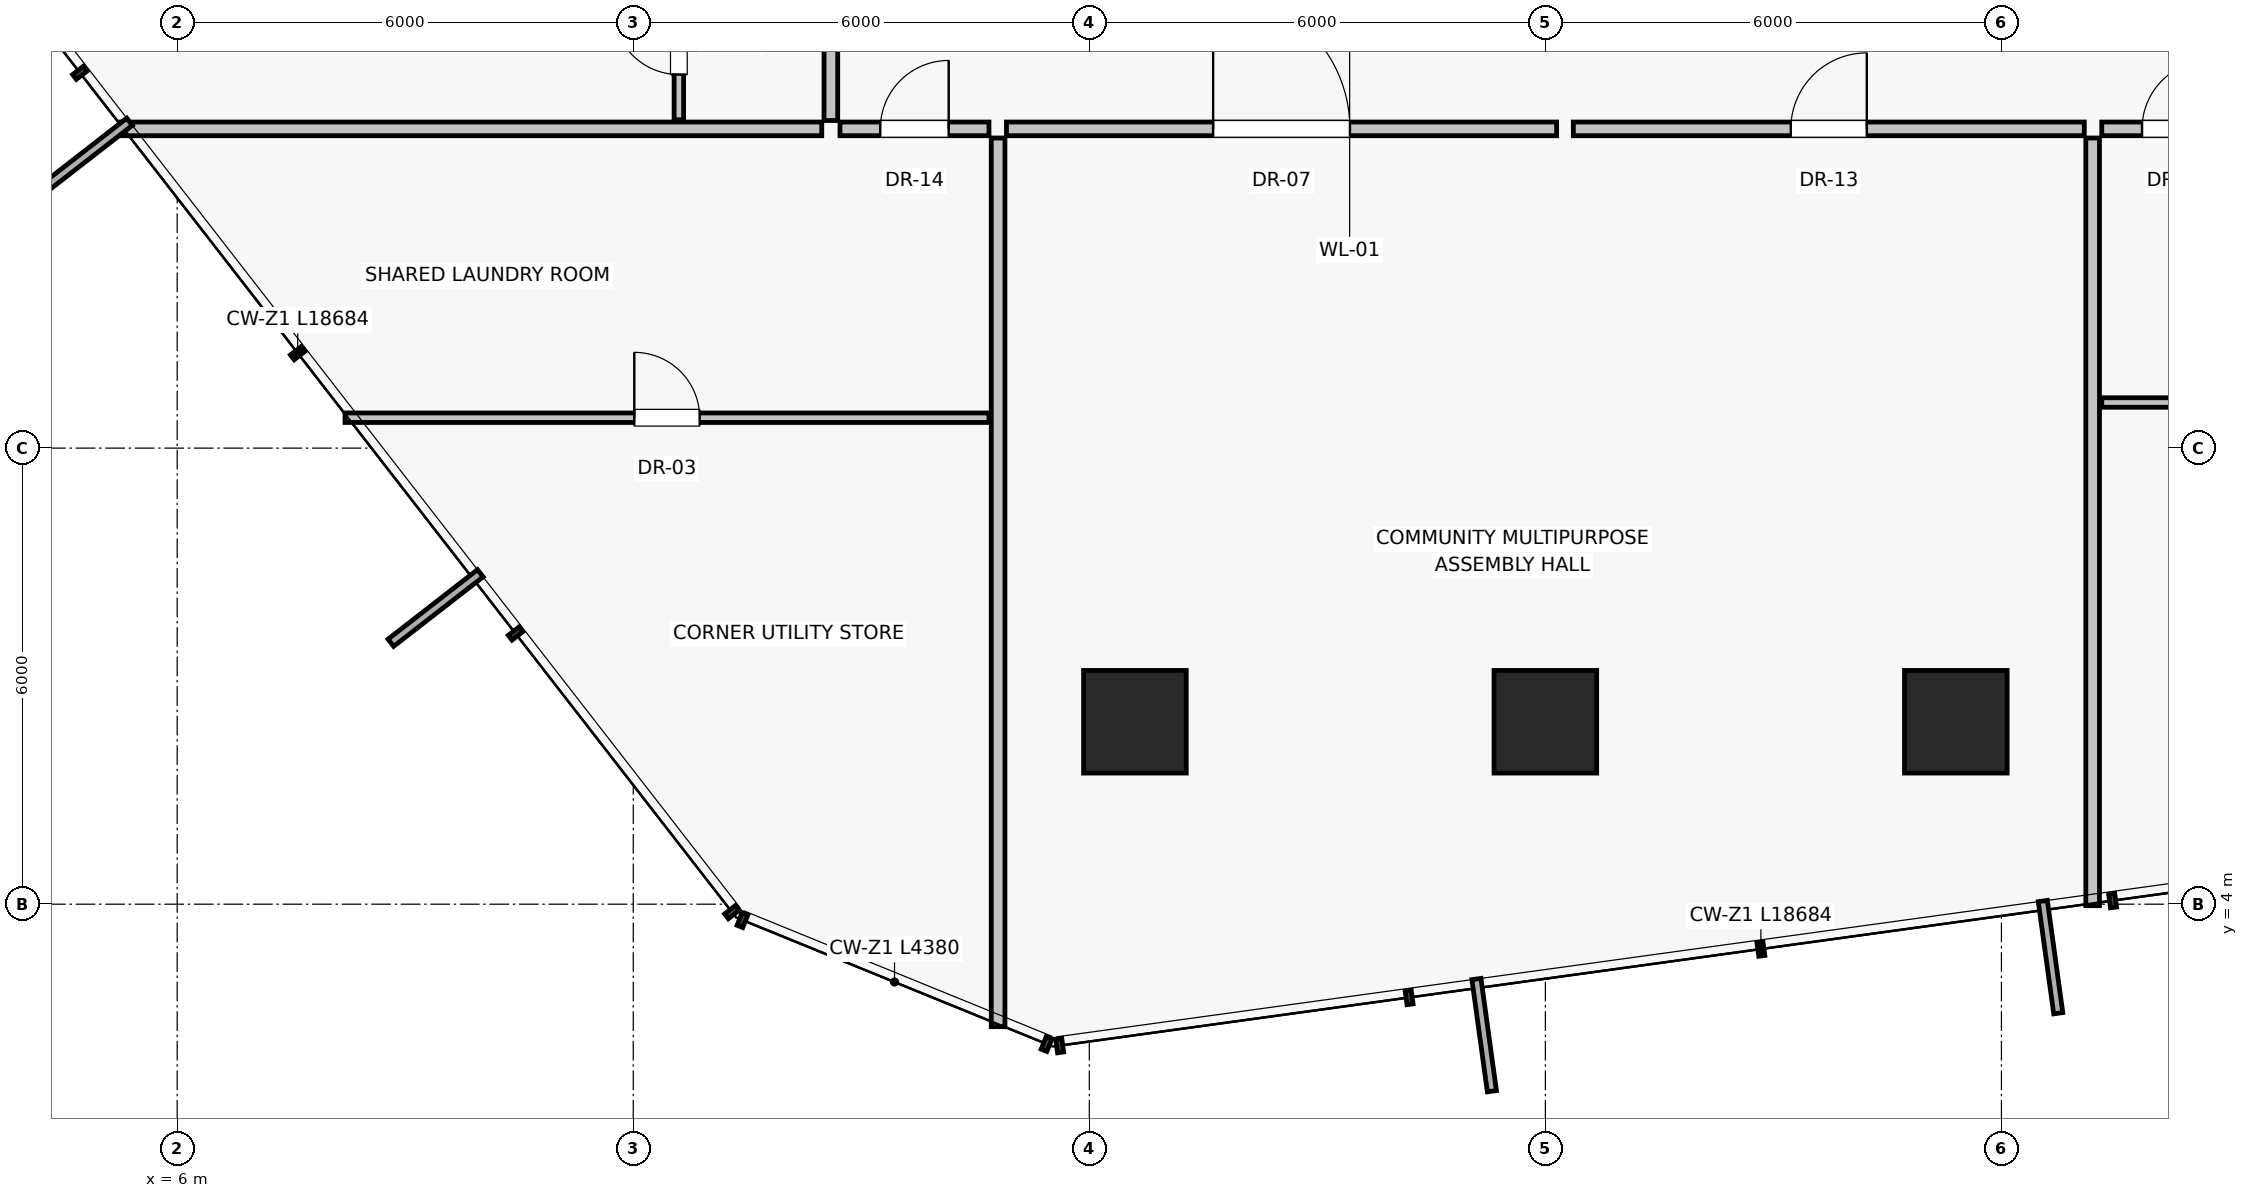
"""IFC4 building model, lengths in metres.
Left out: names, types, materials, properties, quantities, classifications, styles, units other than length and angle.
Written with IfcOpenShell. Run it as: python <this file> out.ifc"""

import sys

from ifc_helpers import new_model, si_unit, direction, frame, frame_2d, origin, origin_2d, place, context, subcontext, project, spatial, rectangle, extrude, source, transform, mapped, element, fill, save


model = new_model("IFC4")
c1 = context("Model", 3, precision=1e-05, world=origin(), true_north=direction((0.0, 1.0)))
c2 = subcontext(c1, "Body", "Model", "MODEL_VIEW")
j1 = project(units=[si_unit("LENGTHUNIT", "METRE"), si_unit("PLANEANGLEUNIT", "RADIAN")], contexts=[c1])
p1 = place(None, origin())
s1 = spatial("IfcSite", under=j1, at=p1, CompositionType="ELEMENT")
p2 = place(p1, origin())
s2 = spatial("IfcBuilding", under=s1, at=p2, CompositionType="ELEMENT")
p3 = place(p2, frame((0.0, 0.0, 50.05)))
s3 = spatial("IfcBuildingStorey", under=s2, at=p3, CompositionType="ELEMENT", Elevation=50.05)
for number, where, z_axis, x_axis in (
    (1, (18.6, 6.4, 0.0), (0.0, 0.0, 1.0), (1.0, 0.0, 0.0)),
    (2, (24.0, 6.4, 0.0), (0.0, 0.0, 1.0), (1.0, 0.0, 0.0)),
    (3, (29.4, 6.4, 0.0), (0.0, 0.0, 1.0), (1.0, 0.0, 0.0)),
):
    element("IfcColumn", number, at=place(p3, frame(where, z_axis=z_axis, x_axis=x_axis)), inside=s3, PredefinedType="COLUMN", context=c2, shape_type="SweptSolid", body=[
        extrude(rectangle(XDim=1.35, YDim=1.35, at=origin_2d()), origin(), (0.0, 0.0, 1.0), 3.25),
    ])
p4 = place(p3, frame((16.8, 14.08, 0.0), z_axis=(0.0, 0.0, 1.0), x_axis=(0.0, -1.0, 0.0)))
e4 = element("IfcWall", 4, at=p4, inside=s3, PredefinedType="PARTITIONING", context=c2, shape_type="SweptSolid", body=[
    extrude(rectangle(XDim=11.692, YDim=0.18, at=frame_2d((5.846, 0.0))), origin(), (0.0, 0.0, 1.0), 3.0),
])
p5 = place(p3, frame((31.2, 14.08, 0.0), z_axis=(0.0, 0.0, 1.0), x_axis=(0.0, -1.0, 0.0)))
e5 = element("IfcWall", 5, at=p5, inside=s3, PredefinedType="PARTITIONING", context=c2, shape_type="SweptSolid", body=[
    extrude(rectangle(XDim=10.1, YDim=0.18, at=frame_2d((5.05, 0.0))), origin(), (0.0, 0.0, 1.0), 3.0),
])
p6 = place(p3, frame((16.91, 14.2, 0.0), z_axis=(0.0, 0.0, 1.0), x_axis=(1.0, 0.0, 0.0)))
e6 = element("IfcWall", 6, at=p6, inside=s3, PredefinedType="PARTITIONING", context=c2, shape_type="SweptSolid", body=[
    extrude(rectangle(XDim=7.238, YDim=0.18, at=frame_2d((3.619, 0.0))), origin(), (0.0, 0.0, 1.0), 3.0),
])
p7 = place(p6, frame((2.719, 0.0, 0.0)))
e7 = element("IfcOpeningElement", 7, at=p7, cuts=e6, PredefinedType="OPENING", context=c2, shape_type="SweptSolid", body=[
    extrude(rectangle(XDim=1.8, YDim=2.25, at=frame_2d((0.9, 1.125))), frame((0.0, 0.1, 0.0), z_axis=(0.0, -1.0, 0.0), x_axis=(1.0, 0.0, 0.0)), (0.0, 0.0, 1.0), 0.2),
])
p8 = place(p3, frame((24.368, 14.2, 0.0), z_axis=(0.0, 0.0, 1.0), x_axis=(1.0, 0.0, 0.0)))
e8 = element("IfcWall", 8, at=p8, inside=s3, PredefinedType="PARTITIONING", context=c2, shape_type="SweptSolid", body=[
    extrude(rectangle(XDim=6.722, YDim=0.18, at=frame_2d((3.361, 0.0))), origin(), (0.0, 0.0, 1.0), 3.0),
])
p9 = place(p8, frame((2.861, 0.0, 0.0)))
e9 = element("IfcOpeningElement", 9, at=p9, cuts=e8, PredefinedType="OPENING", context=c2, shape_type="SweptSolid", body=[
    extrude(rectangle(XDim=1.0, YDim=2.01, at=frame_2d((0.5, 1.005))), frame((0.0, 0.1, 0.0), z_axis=(0.0, -1.0, 0.0), x_axis=(1.0, 0.0, 0.0)), (0.0, 0.0, 1.0), 0.2),
])
p10 = place(p3, frame((14.48, 14.2, 0.0), z_axis=(0.0, 0.0, 1.0), x_axis=(-1.0, 0.0, 0.0)))
e10 = element("IfcWall", 10, at=p10, inside=s3, PredefinedType="PARTITIONING", context=c2, shape_type="SweptSolid", body=[
    extrude(rectangle(XDim=9.224, YDim=0.18, at=frame_2d((4.612, 0.0))), origin(), (0.0, 0.0, 1.0), 3.0),
])
p11 = place(p3, frame((14.6, 14.31, 0.0), z_axis=(0.0, 0.0, 1.0), x_axis=(0.0, 1.0, 0.0)))
e11 = element("IfcWall", 11, at=p11, inside=s3, PredefinedType="PARTITIONING", context=c2, shape_type="SweptSolid", body=[
    extrude(rectangle(XDim=10.088, YDim=0.18, at=frame_2d((5.044, 0.0))), origin(), (0.0, 0.0, 1.0), 3.0),
])
p12 = place(p11, frame((3.426, 0.0, 0.0)))
e12 = element("IfcOpeningElement", 12, at=p12, cuts=e11, PredefinedType="OPENING", context=c2, shape_type="SweptSolid", body=[
    extrude(rectangle(XDim=0.95, YDim=2.02, at=frame_2d((0.475, 1.01))), frame((0.0, 0.1, 0.0), z_axis=(0.0, -1.0, 0.0), x_axis=(1.0, 0.0, 0.0)), (0.0, 0.0, 1.0), 0.2),
])
p13 = place(p3, frame((12.6, 14.32, 0.0), z_axis=(0.0, 0.0, 1.0), x_axis=(0.0, 1.0, 0.0)))
e13 = element("IfcWall", 13, at=p13, inside=s3, PredefinedType="PARTITIONING", context=c2, shape_type="SweptSolid", body=[
    extrude(rectangle(XDim=2.05, YDim=0.125, at=frame_2d((1.025, 0.0))), origin(), (0.0, 0.0, 1.0), 3.0),
])
p14 = place(p13, frame((0.595, 0.0, 0.0)))
e14 = element("IfcOpeningElement", 14, at=p14, cuts=e13, PredefinedType="OPENING", context=c2, shape_type="SweptSolid", body=[
    extrude(rectangle(XDim=0.86, YDim=2.01, at=frame_2d((0.43, 1.005))), frame((0.0, 0.073, 0.0), z_axis=(0.0, -1.0, 0.0), x_axis=(1.0, 0.0, 0.0)), (0.0, 0.0, 1.0), 0.145),
])
p15 = place(p3, frame((14.72, 14.2, 0.0), z_axis=(0.0, 0.0, 1.0), x_axis=(1.0, 0.0, 0.0)))
e15 = element("IfcWall", 15, at=p15, inside=s3, PredefinedType="PARTITIONING", context=c2, shape_type="SweptSolid", body=[
    extrude(rectangle(XDim=1.96, YDim=0.18, at=frame_2d((0.98, 0.0))), origin(), (0.0, 0.0, 1.0), 3.0),
])
p16 = place(p15, frame((0.53, 0.0, 0.0)))
e16 = element("IfcOpeningElement", 16, at=p16, cuts=e15, PredefinedType="OPENING", context=c2, shape_type="SweptSolid", body=[
    extrude(rectangle(XDim=0.9, YDim=2.01, at=frame_2d((0.45, 1.005))), frame((0.0, 0.1, 0.0), z_axis=(0.0, -1.0, 0.0), x_axis=(1.0, 0.0, 0.0)), (0.0, 0.0, 1.0), 0.2),
])
p17 = place(p3, frame((8.208, 10.4, 0.0), z_axis=(0.0, 0.0, 1.0), x_axis=(1.0, 0.0, 0.0)))
e17 = element("IfcWall", 17, at=p17, inside=s3, PredefinedType="PARTITIONING", context=c2, shape_type="SweptSolid", body=[
    extrude(rectangle(XDim=8.472, YDim=0.125, at=frame_2d((4.236, 0.0))), origin(), (0.0, 0.0, 1.0), 3.0),
])
p18 = place(p17, frame((3.806, 0.0, 0.0)))
e18 = element("IfcOpeningElement", 18, at=p18, cuts=e17, PredefinedType="OPENING", context=c2, shape_type="SweptSolid", body=[
    extrude(rectangle(XDim=0.86, YDim=2.01, at=frame_2d((0.43, 1.005))), frame((0.0, 0.073, 0.0), z_axis=(0.0, -1.0, 0.0), x_axis=(1.0, 0.0, 0.0)), (0.0, 0.0, 1.0), 0.145),
])
p19 = place(p3, frame((31.32, 14.2, 0.0), z_axis=(0.0, 0.0, 1.0), x_axis=(1.0, 0.0, 0.0)))
e19 = element("IfcWall", 19, at=p19, inside=s3, PredefinedType="PARTITIONING", context=c2, shape_type="SweptSolid", body=[
    extrude(rectangle(XDim=1.96, YDim=0.18, at=frame_2d((0.98, 0.0))), origin(), (0.0, 0.0, 1.0), 3.0),
])
p20 = place(p19, frame((0.53, 0.0, 0.0)))
e20 = element("IfcOpeningElement", 20, at=p20, cuts=e19, PredefinedType="OPENING", context=c2, shape_type="SweptSolid", body=[
    extrude(rectangle(XDim=0.9, YDim=2.01, at=frame_2d((0.45, 1.005))), frame((0.0, 0.1, 0.0), z_axis=(0.0, -1.0, 0.0), x_axis=(1.0, 0.0, 0.0)), (0.0, 0.0, 1.0), 0.2),
])
p21 = place(p3, frame((31.32, 10.6, 0.0), z_axis=(0.0, 0.0, 1.0), x_axis=(1.0, 0.0, 0.0)))
e21 = element("IfcWall", 21, at=p21, inside=s3, PredefinedType="PARTITIONING", context=c2, shape_type="SweptSolid", body=[
    extrude(rectangle(XDim=9.697, YDim=0.125, at=frame_2d((4.849, 0.0))), origin(), (0.0, 0.0, 1.0), 3.0),
])
p22 = place(p21, frame((4.399, 0.0, 0.0)))
e22 = element("IfcOpeningElement", 22, at=p22, cuts=e21, PredefinedType="OPENING", context=c2, shape_type="SweptSolid", body=[
    extrude(rectangle(XDim=0.9, YDim=2.01, at=frame_2d((0.45, 1.005))), frame((0.0, 0.073, 0.0), z_axis=(0.0, -1.0, 0.0), x_axis=(1.0, 0.0, 0.0)), (0.0, 0.0, 1.0), 0.145),
])
m1 = source(origin(), c2, "Body", "SweptSolid", [
    extrude(rectangle(XDim=1.8, YDim=2.25, at=frame_2d((0.9, 1.125))), frame((0.0, 0.025, 0.0), z_axis=(0.0, -1.0, 0.0), x_axis=(1.0, 0.0, 0.0)), (0.0, 0.0, 1.0), 0.05),
])
p23 = place(p7, origin())
e23 = element("IfcDoor", 23, at=p23, inside=s3, OperationType="SINGLE_SWING_LEFT", PredefinedType="DOOR", context=c2, shape_type="MappedRepresentation", body=[
    mapped(m1, transform((0.0, 0.0, 0.0), scale=1.0)),
])
fill(e7, e23)
m2 = source(origin(), c2, "Body", "SweptSolid", [
    extrude(rectangle(XDim=1.0, YDim=2.01, at=frame_2d((0.5, 1.005))), frame((0.0, 0.025, 0.0), z_axis=(0.0, -1.0, 0.0), x_axis=(1.0, 0.0, 0.0)), (0.0, 0.0, 1.0), 0.05),
])
p24 = place(p9, origin())
e24 = element("IfcDoor", 24, at=p24, inside=s3, OperationType="SINGLE_SWING_RIGHT", PredefinedType="DOOR", context=c2, shape_type="MappedRepresentation", body=[
    mapped(m2, transform((0.0, 0.0, 0.0), scale=1.0)),
])
fill(e9, e24)
m3 = source(origin(), c2, "Body", "SweptSolid", [
    extrude(rectangle(XDim=0.86, YDim=2.01, at=frame_2d((0.43, 1.005))), frame((0.0, 0.025, 0.0), z_axis=(0.0, -1.0, 0.0), x_axis=(1.0, 0.0, 0.0)), (0.0, 0.0, 1.0), 0.05),
])
p25 = place(p14, origin())
e25 = element("IfcDoor", 25, at=p25, inside=s3, OperationType="SINGLE_SWING_RIGHT", PredefinedType="DOOR", context=c2, shape_type="MappedRepresentation", body=[
    mapped(m3, transform((0.0, 0.0, 0.0), scale=1.0)),
])
fill(e14, e25)
m4 = source(origin(), c2, "Body", "SweptSolid", [
    extrude(rectangle(XDim=0.9, YDim=2.01, at=frame_2d((0.45, 1.005))), frame((0.0, 0.025, 0.0), z_axis=(0.0, -1.0, 0.0), x_axis=(1.0, 0.0, 0.0)), (0.0, 0.0, 1.0), 0.05),
])
p26 = place(p16, origin())
e26 = element("IfcDoor", 26, at=p26, inside=s3, OperationType="SINGLE_SWING_RIGHT", PredefinedType="DOOR", context=c2, shape_type="MappedRepresentation", body=[
    mapped(m4, transform((0.0, 0.0, 0.0), scale=1.0)),
])
fill(e16, e26)
p27 = place(p18, origin())
e27 = element("IfcDoor", 27, at=p27, inside=s3, OperationType="SINGLE_SWING_LEFT", PredefinedType="DOOR", context=c2, shape_type="MappedRepresentation", body=[
    mapped(m3, transform((0.0, 0.0, 0.0), scale=1.0)),
])
fill(e18, e27)
p28 = place(p20, origin())
e28 = element("IfcDoor", 28, at=p28, inside=s3, OperationType="SINGLE_SWING_RIGHT", PredefinedType="DOOR", context=c2, shape_type="MappedRepresentation", body=[
    mapped(m4, transform((0.0, 0.0, 0.0), scale=1.0)),
])
fill(e20, e28)
save(model, sys.argv[1])
